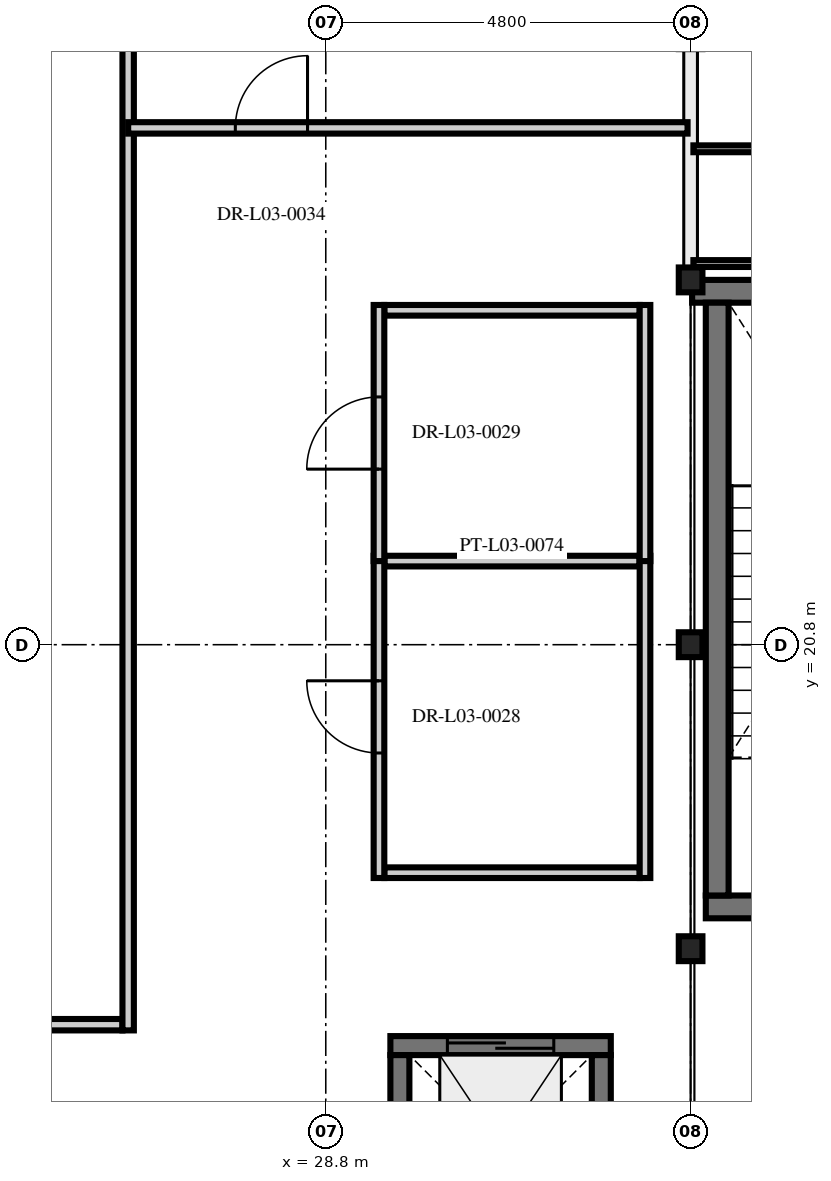
"""IFC4 building model, lengths in metres.
Left out: names, types, materials, properties, quantities, classifications, styles, units other than length and angle.
Written with IfcOpenShell. Run it as: python <this file> out.ifc"""

import sys

from ifc_helpers import new_model, si_unit, direction, frame, frame_2d, origin, origin_2d, place, context, subcontext, project, spatial, rectangle, i_section, extrude, element, fill, save


model = new_model("IFC4")
c1 = context("Model", 3, precision=1e-05, world=origin(), true_north=direction((0.0, 1.0)))
c2 = subcontext(c1, "Body", "Model", "MODEL_VIEW")
j1 = project(units=[si_unit("LENGTHUNIT", "METRE"), si_unit("PLANEANGLEUNIT", "RADIAN")], contexts=[c1])
p1 = place(None, origin())
s1 = spatial("IfcSite", under=j1, at=p1, CompositionType="ELEMENT")
p2 = place(p1, origin())
s2 = spatial("IfcBuilding", under=s1, at=p2, CompositionType="ELEMENT")
p3 = place(p2, frame((0.0, 0.0, 14.1)))
s3 = spatial("IfcBuildingStorey", under=s2, at=p3, CompositionType="ELEMENT", Elevation=14.1)
for number, where, z_axis, x_axis in (
    (1, (33.6, 16.8, 0.0), (0.0, 0.0, 1.0), (1.0, 0.0, 0.0)),
    (2, (33.6, 20.8, 0.0), (0.0, 0.0, 1.0), (1.0, 0.0, 0.0)),
    (3, (33.6, 25.6, 0.0), (0.0, 0.0, 1.0), (1.0, 0.0, 0.0)),
):
    element("IfcColumn", number, at=place(p3, frame(where, z_axis=z_axis, x_axis=x_axis)), inside=s3, PredefinedType="COLUMN", context=c2, shape_type="SweptSolid", body=[
        extrude(i_section(OverallWidth=0.311, OverallDepth=0.327, WebThickness=0.016, FlangeThickness=0.025, at=origin_2d()), origin(), (0.0, 0.0, 1.0), 4.5),
    ])
p4 = place(p3, frame((38.2, 17.35, 0.0), z_axis=(0.0, 0.0, 1.0), x_axis=(-1.0, 0.0, 0.0)))
e4 = element("IfcWall", 4, at=p4, inside=s3, PredefinedType="SHEAR", context=c2, shape_type="SweptSolid", body=[
    extrude(rectangle(XDim=4.4, YDim=0.3, at=frame_2d((2.2, 0.0))), origin(), (0.0, 0.0, 1.0), 4.25),
])
p5 = place(p4, frame((1.65, 0.0, 0.0)))
e5 = element("IfcOpeningElement", 5, at=p5, cuts=e4, PredefinedType="OPENING", context=c2, shape_type="SweptSolid", body=[
    extrude(rectangle(XDim=1.1, YDim=2.2, at=frame_2d((0.55, 1.1))), frame((0.0, 0.16, 0.0), z_axis=(0.0, -1.0, 0.0), x_axis=(1.0, 0.0, 0.0)), (0.0, 0.0, 1.0), 0.32),
])
p6 = place(p3, frame((33.62, 25.45, 0.0), z_axis=(0.0, 0.0, 1.0), x_axis=(1.0, 0.0, 0.0)))
e6 = element("IfcWall", 6, at=p6, inside=s3, PredefinedType="SHEAR", context=c2, shape_type="SweptSolid", body=[
    extrude(rectangle(XDim=4.76, YDim=0.3, at=frame_2d((2.38, 0.0))), origin(), (0.0, 0.0, 1.0), 4.25),
])
p7 = place(p3, frame((33.95, 17.5, 0.0), z_axis=(0.0, 0.0, 1.0), x_axis=(0.0, 1.0, 0.0)))
e7 = element("IfcWall", 7, at=p7, inside=s3, PredefinedType="SHEAR", context=c2, shape_type="SweptSolid", body=[
    extrude(rectangle(XDim=7.8, YDim=0.3, at=frame_2d((3.9, 0.0))), origin(), (0.0, 0.0, 1.0), 4.25),
])
p8 = place(p3, frame((29.65, 15.525, 0.0), z_axis=(0.0, 0.0, 1.0), x_axis=(1.0, 0.0, 0.0)))
e8 = element("IfcWall", 8, at=p8, inside=s3, PredefinedType="SHEAR", context=c2, shape_type="SweptSolid", body=[
    extrude(rectangle(XDim=2.9, YDim=0.25, at=frame_2d((1.45, 0.0))), origin(), (0.0, 0.0, 1.0), 4.25),
])
p9 = place(p8, frame((0.75, 0.0, 0.0)))
e9 = element("IfcOpeningElement", 9, at=p9, cuts=e8, PredefinedType="OPENING", context=c2, shape_type="SweptSolid", body=[
    extrude(rectangle(XDim=1.4, YDim=2.2, at=frame_2d((0.7, 1.1))), frame((0.0, 0.135, 0.0), z_axis=(0.0, -1.0, 0.0), x_axis=(1.0, 0.0, 0.0)), (0.0, 0.0, 1.0), 0.27),
])
for number, where, z_axis, x_axis in (
    (10, (29.775, 13.0, 0.0), (0.0, 0.0, 1.0), (0.0, 1.0, 0.0)),
    (11, (32.425, 15.4, 0.0), (0.0, 0.0, 1.0), (0.0, -1.0, 0.0)),
):
    element("IfcWall", number, at=place(p3, frame(where, z_axis=z_axis, x_axis=x_axis)), inside=s3, PredefinedType="SHEAR", context=c2, shape_type="SweptSolid", body=[
        extrude(rectangle(XDim=2.4, YDim=0.25, at=frame_2d((1.2, 0.0))), origin(), (0.0, 0.0, 1.0), 4.25),
    ])
for number, where, z_axis, x_axis in (
    (12, (29.57, 17.8, 0.0), (0.0, 0.0, 1.0), (1.0, 0.0, 0.0)),
    (13, (29.57, 21.9, 0.0), (0.0, 0.0, 1.0), (1.0, 0.0, 0.0)),
):
    element("IfcWall", number, at=place(p3, frame(where, z_axis=z_axis, x_axis=x_axis)), inside=s3, PredefinedType="PARTITIONING", context=c2, shape_type="SweptSolid", body=[
        extrude(rectangle(XDim=3.36, YDim=0.14, at=frame_2d((1.68, 0.0))), origin(), (0.0, 0.0, 1.0), 3.625),
    ])
p10 = place(p3, frame((29.5, 17.73, 0.0), z_axis=(0.0, 0.0, 1.0), x_axis=(0.0, 1.0, 0.0)))
e14 = element("IfcWall", 14, at=p10, inside=s3, PredefinedType="PARTITIONING", context=c2, shape_type="SweptSolid", body=[
    extrude(rectangle(XDim=4.24, YDim=0.14, at=frame_2d((2.12, 0.0))), origin(), (0.0, 0.0, 1.0), 3.675),
])
p11 = place(p10, frame((1.645, 0.0, 0.0)))
e15 = element("IfcOpeningElement", 15, at=p11, cuts=e14, PredefinedType="OPENING", context=c2, shape_type="SweptSolid", body=[
    extrude(rectangle(XDim=0.95, YDim=2.1, at=frame_2d((0.475, 1.05))), frame((0.0, 0.08, 0.0), z_axis=(0.0, -1.0, 0.0), x_axis=(1.0, 0.0, 0.0)), (0.0, 0.0, 1.0), 0.16),
])
p12 = place(p3, frame((33.0, 17.73, 0.0), z_axis=(0.0, 0.0, 1.0), x_axis=(0.0, 1.0, 0.0)))
e16 = element("IfcWall", 16, at=p12, inside=s3, PredefinedType="PARTITIONING", context=c2, shape_type="SweptSolid", body=[
    extrude(rectangle(XDim=4.24, YDim=0.14, at=frame_2d((2.12, 0.0))), origin(), (0.0, 0.0, 1.0), 3.675),
])
p13 = place(p3, frame((29.57, 25.2, 0.0), z_axis=(0.0, 0.0, 1.0), x_axis=(1.0, 0.0, 0.0)))
e17 = element("IfcWall", 17, at=p13, inside=s3, PredefinedType="PARTITIONING", context=c2, shape_type="SweptSolid", body=[
    extrude(rectangle(XDim=3.36, YDim=0.14, at=frame_2d((1.68, 0.0))), origin(), (0.0, 0.0, 1.0), 3.625),
])
p14 = place(p3, frame((29.5, 21.9, 0.0), z_axis=(0.0, 0.0, 1.0), x_axis=(0.0, 1.0, 0.0)))
e18 = element("IfcWall", 18, at=p14, inside=s3, PredefinedType="PARTITIONING", context=c2, shape_type="SweptSolid", body=[
    extrude(rectangle(XDim=3.37, YDim=0.14, at=frame_2d((1.685, 0.0))), origin(), (0.0, 0.0, 1.0), 4.25),
])
p15 = place(p14, frame((1.21, 0.0, 0.0)))
e19 = element("IfcOpeningElement", 19, at=p15, cuts=e18, PredefinedType="OPENING", context=c2, shape_type="SweptSolid", body=[
    extrude(rectangle(XDim=0.95, YDim=2.1, at=frame_2d((0.475, 1.05))), frame((0.0, 0.08, 0.0), z_axis=(0.0, -1.0, 0.0), x_axis=(1.0, 0.0, 0.0)), (0.0, 0.0, 1.0), 0.16),
])
p16 = place(p3, frame((33.0, 21.9, 0.0), z_axis=(0.0, 0.0, 1.0), x_axis=(0.0, 1.0, 0.0)))
e20 = element("IfcWall", 20, at=p16, inside=s3, PredefinedType="PARTITIONING", context=c2, shape_type="SweptSolid", body=[
    extrude(rectangle(XDim=3.37, YDim=0.14, at=frame_2d((1.685, 0.0))), origin(), (0.0, 0.0, 1.0), 4.25),
])
p17 = place(p3, frame((9.675, 15.8, 0.0), z_axis=(0.0, 0.0, 1.0), x_axis=(1.0, 0.0, 0.0)))
e21 = element("IfcWall", 21, at=p17, inside=s3, PredefinedType="PARTITIONING", context=c2, shape_type="SweptSolid", body=[
    extrude(rectangle(XDim=16.45, YDim=0.15, at=frame_2d((8.225, 0.0))), origin(), (0.0, 0.0, 1.0), 3.625),
])
p18 = place(p3, frame((26.2, 15.725, 0.0), z_axis=(0.0, 0.0, 1.0), x_axis=(0.0, 1.0, 0.0)))
e22 = element("IfcWall", 22, at=p18, inside=s3, PredefinedType="PARTITIONING", context=c2, shape_type="SweptSolid", body=[
    extrude(rectangle(XDim=21.035, YDim=0.15, at=frame_2d((10.518, 0.0))), origin(), (0.0, 0.0, 1.0), 3.675),
])
p19 = place(p3, frame((26.2, 27.6, 0.0), z_axis=(0.0, 0.0, 1.0), x_axis=(1.0, 0.0, 0.0)))
e23 = element("IfcWall", 23, at=p19, inside=s3, PredefinedType="PARTITIONING", context=c2, shape_type="SweptSolid", body=[
    extrude(rectangle(XDim=7.36, YDim=0.15, at=frame_2d((3.68, 0.0))), origin(), (0.0, 0.0, 1.0), 3.625),
])
p20 = place(p19, frame((1.41, 0.0, 0.0)))
e24 = element("IfcOpeningElement", 24, at=p20, cuts=e23, PredefinedType="OPENING", context=c2, shape_type="SweptSolid", body=[
    extrude(rectangle(XDim=0.95, YDim=2.15, at=frame_2d((0.475, 1.075))), frame((0.0, 0.085, 0.0), z_axis=(0.0, -1.0, 0.0), x_axis=(1.0, 0.0, 0.0)), (0.0, 0.0, 1.0), 0.17),
])
p21 = place(p9, origin())
e25 = element("IfcDoor", 25, at=p21, inside=s3, OperationType="DOUBLE_DOOR_SLIDING", PredefinedType="DOOR", context=c2, shape_type="SweptSolid", body=[
    extrude(rectangle(XDim=1.4, YDim=2.2, at=frame_2d((0.7, 1.1))), frame((0.0, 0.025, 0.0), z_axis=(0.0, -1.0, 0.0), x_axis=(1.0, 0.0, 0.0)), (0.0, 0.0, 1.0), 0.05),
])
fill(e9, e25)
p22 = place(p11, origin())
e26 = element("IfcDoor", 26, at=p22, inside=s3, OperationType="SINGLE_SWING_RIGHT", PredefinedType="DOOR", context=c2, shape_type="SweptSolid", body=[
    extrude(rectangle(XDim=0.95, YDim=2.1, at=frame_2d((0.475, 1.05))), frame((0.0, 0.025, 0.0), z_axis=(0.0, -1.0, 0.0), x_axis=(1.0, 0.0, 0.0)), (0.0, 0.0, 1.0), 0.05),
])
fill(e15, e26)
p23 = place(p15, origin())
e27 = element("IfcDoor", 27, at=p23, inside=s3, OperationType="SINGLE_SWING_LEFT", PredefinedType="DOOR", context=c2, shape_type="SweptSolid", body=[
    extrude(rectangle(XDim=0.95, YDim=2.1, at=frame_2d((0.475, 1.05))), frame((0.0, 0.025, 0.0), z_axis=(0.0, -1.0, 0.0), x_axis=(1.0, 0.0, 0.0)), (0.0, 0.0, 1.0), 0.05),
])
fill(e19, e27)
p24 = place(p20, origin())
e28 = element("IfcDoor", 28, at=p24, inside=s3, OperationType="SINGLE_SWING_RIGHT", PredefinedType="DOOR", context=c2, shape_type="SweptSolid", body=[
    extrude(rectangle(XDim=0.95, YDim=2.15, at=frame_2d((0.475, 1.075))), frame((0.0, 0.025, 0.0), z_axis=(0.0, -1.0, 0.0), x_axis=(1.0, 0.0, 0.0)), (0.0, 0.0, 1.0), 0.05),
])
fill(e24, e28)
save(model, sys.argv[1])
